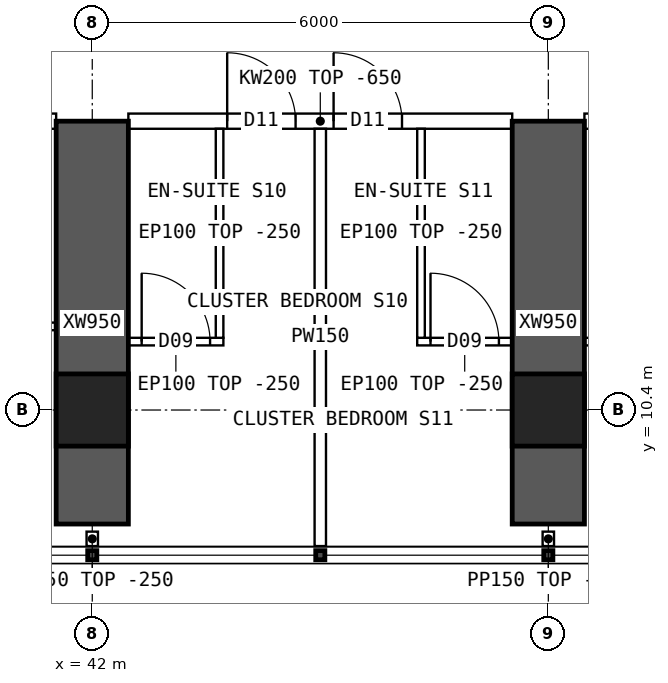
"""IFC4 building model, lengths in metres.
Left out: names, types, materials, properties, quantities, classifications, styles, units other than length and angle.
Written with IfcOpenShell. Run it as: python <this file> out.ifc"""

import sys

from ifc_helpers import new_model, si_unit, direction, frame, frame_2d, origin, origin_2d, place, context, subcontext, project, spatial, polyline, rectangle, hollow_rectangle, outline, extrude, element, fill, save


model = new_model("IFC4")
c1 = context("Model", 3, precision=1e-05, world=origin(), true_north=direction((0.0, 1.0)))
c2 = subcontext(c1, "Body", "Model", "MODEL_VIEW")
j1 = project(units=[si_unit("LENGTHUNIT", "METRE"), si_unit("PLANEANGLEUNIT", "RADIAN")], contexts=[c1])
p1 = place(None, origin())
s1 = spatial("IfcSite", under=j1, at=p1, CompositionType="ELEMENT")
p2 = place(p1, origin())
s2 = spatial("IfcBuilding", under=s1, at=p2, CompositionType="ELEMENT")
p3 = place(p2, frame((0.0, 0.0, 106.9)))
s3 = spatial("IfcBuildingStorey", under=s2, at=p3, CompositionType="ELEMENT", Elevation=106.9)
for number, where, z_axis, x_axis in (
    (1, (42.0, 10.4, 0.0), (0.0, 0.0, 1.0), (1.0, 0.0, 0.0)),
    (2, (48.0, 10.4, 0.0), (0.0, 0.0, 1.0), (1.0, 0.0, 0.0)),
):
    element("IfcColumn", number, at=place(p3, frame(where, z_axis=z_axis, x_axis=x_axis)), inside=s3, PredefinedType="COLUMN", context=c2, shape_type="SweptSolid", body=[
        extrude(hollow_rectangle(XDim=0.95, YDim=0.95, WallThickness=0.095, at=origin_2d()), origin(), (0.0, 0.0, 1.0), 3.75),
    ])
for number, where, z_axis, x_axis in (
    (3, (42.0, 8.9, 0.0), (0.0, 0.0, 1.0), (0.0, 1.0, 0.0)),
    (4, (48.0, 8.9, 0.0), (0.0, 0.0, 1.0), (0.0, 1.0, 0.0)),
):
    element("IfcWall", number, at=place(p3, frame(where, z_axis=z_axis, x_axis=x_axis)), inside=s3, PredefinedType="SHEAR", context=c2, shape_type="SweptSolid", body=[
        extrude(rectangle(XDim=5.3, YDim=0.95, at=frame_2d((2.65, 0.0))), origin(), (0.0, 0.0, 1.0), 3.75),
    ])
p4 = place(p3, frame((36.475, 14.2, 0.0), z_axis=(0.0, 0.0, 1.0), x_axis=(1.0, 0.0, 0.0)))
e5 = element("IfcWall", 5, at=p4, inside=s3, PredefinedType="SOLIDWALL", context=c2, shape_type="SweptSolid", body=[
    extrude(outline(polyline([(0.0, 0.0), (5.05, 0.0), (5.05, 3.1), (0.0, 3.1), (0.0, 0.0)])), frame((0.0, 0.1, 0.0), z_axis=(0.0, -1.0, 0.0), x_axis=(1.0, 0.0, 0.0)), (0.0, 0.0, 1.0), 0.2),
])
p5 = place(p4, frame((0.3, 0.0, 0.0)))
e6 = element("IfcOpeningElement", 6, at=p5, cuts=e5, PredefinedType="OPENING", context=c2, shape_type="SweptSolid", body=[
    extrude(rectangle(XDim=1.0, YDim=2.1, at=frame_2d((0.5, 1.05))), frame((0.0, 0.11, 0.0), z_axis=(0.0, -1.0, 0.0), x_axis=(1.0, 0.0, 0.0)), (0.0, 0.0, 1.0), 0.22),
])
p6 = place(p3, frame((42.475, 14.2, 0.0), z_axis=(0.0, 0.0, 1.0), x_axis=(1.0, 0.0, 0.0)))
e7 = element("IfcWall", 7, at=p6, inside=s3, PredefinedType="SOLIDWALL", context=c2, shape_type="SweptSolid", body=[
    extrude(outline(polyline([(0.0, 0.0), (5.05, 0.0), (5.05, 3.1), (0.0, 3.1), (0.0, 0.0)])), frame((0.0, 0.1, 0.0), z_axis=(0.0, -1.0, 0.0), x_axis=(1.0, 0.0, 0.0)), (0.0, 0.0, 1.0), 0.2),
])
p7 = place(p6, frame((1.3, 0.0, 0.0)))
e8 = element("IfcOpeningElement", 8, at=p7, cuts=e7, PredefinedType="OPENING", context=c2, shape_type="SweptSolid", body=[
    extrude(rectangle(XDim=0.9, YDim=2.1, at=frame_2d((0.45, 1.05))), frame((0.0, 0.11, 0.0), z_axis=(0.0, -1.0, 0.0), x_axis=(1.0, 0.0, 0.0)), (0.0, 0.0, 1.0), 0.22),
])
p8 = place(p6, frame((2.7, 0.0, 0.0)))
e9 = element("IfcOpeningElement", 9, at=p8, cuts=e7, PredefinedType="OPENING", context=c2, shape_type="SweptSolid", body=[
    extrude(rectangle(XDim=0.9, YDim=2.1, at=frame_2d((0.45, 1.05))), frame((0.0, 0.11, 0.0), z_axis=(0.0, -1.0, 0.0), x_axis=(1.0, 0.0, 0.0)), (0.0, 0.0, 1.0), 0.22),
])
p9 = place(p3, frame((48.475, 14.2, 0.0), z_axis=(0.0, 0.0, 1.0), x_axis=(1.0, 0.0, 0.0)))
e10 = element("IfcWall", 10, at=p9, inside=s3, PredefinedType="SOLIDWALL", context=c2, shape_type="SweptSolid", body=[
    extrude(outline(polyline([(0.0, 0.0), (5.05, 0.0), (5.05, 3.1), (0.0, 3.1), (0.0, 0.0)])), frame((0.0, 0.1, 0.0), z_axis=(0.0, -1.0, 0.0), x_axis=(1.0, 0.0, 0.0)), (0.0, 0.0, 1.0), 0.2),
])
p10 = place(p9, frame((1.3, 0.0, 0.0)))
e11 = element("IfcOpeningElement", 11, at=p10, cuts=e10, PredefinedType="OPENING", context=c2, shape_type="SweptSolid", body=[
    extrude(rectangle(XDim=0.9, YDim=2.1, at=frame_2d((0.45, 1.05))), frame((0.0, 0.11, 0.0), z_axis=(0.0, -1.0, 0.0), x_axis=(1.0, 0.0, 0.0)), (0.0, 0.0, 1.0), 0.22),
])
p11 = place(p9, frame((2.7, 0.0, 0.0)))
e12 = element("IfcOpeningElement", 12, at=p11, cuts=e10, PredefinedType="OPENING", context=c2, shape_type="SweptSolid", body=[
    extrude(rectangle(XDim=0.9, YDim=2.1, at=frame_2d((0.45, 1.05))), frame((0.0, 0.11, 0.0), z_axis=(0.0, -1.0, 0.0), x_axis=(1.0, 0.0, 0.0)), (0.0, 0.0, 1.0), 0.22),
])
p12 = place(p3, frame((38.875, 11.5, 0.0), z_axis=(0.0, 0.0, 1.0), x_axis=(1.0, 0.0, 0.0)))
e13 = element("IfcWall", 13, at=p12, inside=s3, PredefinedType="PARTITIONING", context=c2, shape_type="SweptSolid", body=[
    extrude(rectangle(XDim=2.65, YDim=0.1, at=frame_2d((1.325, 0.0))), origin(), (0.0, 0.0, 1.0), 3.5),
])
p13 = place(p3, frame((45.0, 8.61, 0.0), z_axis=(0.0, 0.0, 1.0), x_axis=(0.0, 1.0, 0.0)))
e14 = element("IfcWall", 14, at=p13, inside=s3, PredefinedType="PARTITIONING", context=c2, shape_type="SweptSolid", body=[
    extrude(outline(polyline([(0.0, 0.0), (5.49, 0.0), (5.49, 3.1), (5.442, 3.1), (5.44, 3.5), (1.992, 3.5), (1.99, 3.1), (1.592, 3.1), (1.59, 3.5), (0.0, 3.5), (0.0, 0.0)])), frame((0.0, 0.075, 0.0), z_axis=(0.0, -1.0, 0.0), x_axis=(1.0, 0.0, 0.0)), (0.0, 0.0, 1.0), 0.15),
])
p14 = place(p3, frame((43.725, 11.3, 0.0), z_axis=(0.0, 0.0, 1.0), x_axis=(-1.0, 0.0, 0.0)))
e15 = element("IfcWall", 15, at=p14, inside=s3, PredefinedType="PARTITIONING", context=c2, shape_type="SweptSolid", body=[
    extrude(rectangle(XDim=1.25, YDim=0.1, at=frame_2d((0.625, 0.0))), origin(), (0.0, 0.0, 1.0), 3.5),
])
p15 = place(p14, frame((0.175, 0.0, 0.0)))
e16 = element("IfcOpeningElement", 16, at=p15, cuts=e15, PredefinedType="OPENING", context=c2, shape_type="SweptSolid", body=[
    extrude(rectangle(XDim=0.9, YDim=2.1, at=frame_2d((0.45, 1.05))), frame((0.0, 0.06, 0.0), z_axis=(0.0, -1.0, 0.0), x_axis=(1.0, 0.0, 0.0)), (0.0, 0.0, 1.0), 0.12),
])
p16 = place(p3, frame((43.675, 11.35, 0.0), z_axis=(0.0, 0.0, 1.0), x_axis=(0.0, 1.0, 0.0)))
e17 = element("IfcWall", 17, at=p16, inside=s3, PredefinedType="PARTITIONING", context=c2, shape_type="SweptSolid", body=[
    extrude(outline(polyline([(0.0, 0.0), (2.75, 0.0), (2.75, 3.1), (2.702, 3.1), (2.7, 3.5), (0.0, 3.5), (0.0, 0.0)])), frame((0.0, 0.05, 0.0), z_axis=(0.0, -1.0, 0.0), x_axis=(1.0, 0.0, 0.0)), (0.0, 0.0, 1.0), 0.1),
])
p17 = place(p3, frame((47.525, 11.3, 0.0), z_axis=(0.0, 0.0, 1.0), x_axis=(-1.0, 0.0, 0.0)))
e18 = element("IfcWall", 18, at=p17, inside=s3, PredefinedType="PARTITIONING", context=c2, shape_type="SweptSolid", body=[
    extrude(rectangle(XDim=1.25, YDim=0.1, at=frame_2d((0.625, 0.0))), origin(), (0.0, 0.0, 1.0), 3.5),
])
p18 = place(p17, frame((0.175, 0.0, 0.0)))
e19 = element("IfcOpeningElement", 19, at=p18, cuts=e18, PredefinedType="OPENING", context=c2, shape_type="SweptSolid", body=[
    extrude(rectangle(XDim=0.9, YDim=2.1, at=frame_2d((0.45, 1.05))), frame((0.0, 0.06, 0.0), z_axis=(0.0, -1.0, 0.0), x_axis=(1.0, 0.0, 0.0)), (0.0, 0.0, 1.0), 0.12),
])
p19 = place(p3, frame((46.325, 11.35, 0.0), z_axis=(0.0, 0.0, 1.0), x_axis=(0.0, 1.0, 0.0)))
e20 = element("IfcWall", 20, at=p19, inside=s3, PredefinedType="PARTITIONING", context=c2, shape_type="SweptSolid", body=[
    extrude(outline(polyline([(0.0, 0.0), (2.75, 0.0), (2.75, 3.1), (2.702, 3.1), (2.7, 3.5), (0.0, 3.5), (0.0, 0.0)])), frame((0.0, 0.05, 0.0), z_axis=(0.0, -1.0, 0.0), x_axis=(1.0, 0.0, 0.0)), (0.0, 0.0, 1.0), 0.1),
])
p20 = place(p3, frame((49.725, 11.3, 0.0), z_axis=(0.0, 0.0, 1.0), x_axis=(-1.0, 0.0, 0.0)))
e21 = element("IfcWall", 21, at=p20, inside=s3, PredefinedType="PARTITIONING", context=c2, shape_type="SweptSolid", body=[
    extrude(rectangle(XDim=1.25, YDim=0.1, at=frame_2d((0.625, 0.0))), origin(), (0.0, 0.0, 1.0), 3.5),
])
p21 = place(p20, frame((0.175, 0.0, 0.0)))
e22 = element("IfcOpeningElement", 22, at=p21, cuts=e21, PredefinedType="OPENING", context=c2, shape_type="SweptSolid", body=[
    extrude(rectangle(XDim=0.9, YDim=2.1, at=frame_2d((0.45, 1.05))), frame((0.0, 0.06, 0.0), z_axis=(0.0, -1.0, 0.0), x_axis=(1.0, 0.0, 0.0)), (0.0, 0.0, 1.0), 0.12),
])
for number, where, z_axis, x_axis in (
    (23, (42.0, 8.8, 0.0), (0.0, 0.0, 1.0), (0.0, -1.0, 0.0)),
    (24, (48.0, 8.8, 0.0), (0.0, 0.0, 1.0), (0.0, -1.0, 0.0)),
):
    element("IfcWall", number, at=place(p3, frame(where, z_axis=z_axis, x_axis=x_axis)), inside=s3, PredefinedType="PARTITIONING", context=c2, shape_type="SweptSolid", body=[
        extrude(rectangle(XDim=0.19, YDim=0.15, at=frame_2d((0.095, 0.0))), origin(), (0.0, 0.0, 1.0), 3.5),
    ])
p22 = place(p15, origin())
e25 = element("IfcDoor", 25, at=p22, inside=s3, OperationType="SINGLE_SWING_RIGHT", PredefinedType="DOOR", context=c2, shape_type="SweptSolid", body=[
    extrude(rectangle(XDim=0.9, YDim=2.1, at=frame_2d((0.45, 1.05))), frame((0.0, 0.025, 0.0), z_axis=(0.0, -1.0, 0.0), x_axis=(1.0, 0.0, 0.0)), (0.0, 0.0, 1.0), 0.05),
])
fill(e16, e25)
p23 = place(p7, origin())
e26 = element("IfcDoor", 26, at=p23, inside=s3, OperationType="SINGLE_SWING_LEFT", PredefinedType="DOOR", context=c2, shape_type="SweptSolid", body=[
    extrude(rectangle(XDim=0.9, YDim=2.1, at=frame_2d((0.45, 1.05))), frame((0.0, 0.025, 0.0), z_axis=(0.0, -1.0, 0.0), x_axis=(1.0, 0.0, 0.0)), (0.0, 0.0, 1.0), 0.05),
])
fill(e8, e26)
p24 = place(p18, origin())
e27 = element("IfcDoor", 27, at=p24, inside=s3, OperationType="SINGLE_SWING_RIGHT", PredefinedType="DOOR", context=c2, shape_type="SweptSolid", body=[
    extrude(rectangle(XDim=0.9, YDim=2.1, at=frame_2d((0.45, 1.05))), frame((0.0, 0.025, 0.0), z_axis=(0.0, -1.0, 0.0), x_axis=(1.0, 0.0, 0.0)), (0.0, 0.0, 1.0), 0.05),
])
fill(e19, e27)
p25 = place(p8, origin())
e28 = element("IfcDoor", 28, at=p25, inside=s3, OperationType="SINGLE_SWING_LEFT", PredefinedType="DOOR", context=c2, shape_type="SweptSolid", body=[
    extrude(rectangle(XDim=0.9, YDim=2.1, at=frame_2d((0.45, 1.05))), frame((0.0, 0.025, 0.0), z_axis=(0.0, -1.0, 0.0), x_axis=(1.0, 0.0, 0.0)), (0.0, 0.0, 1.0), 0.05),
])
fill(e9, e28)
save(model, sys.argv[1])
